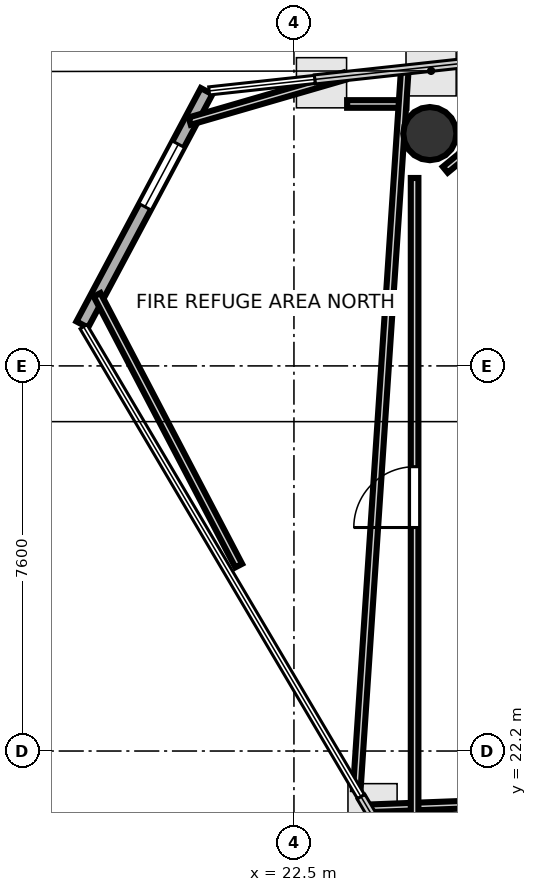
"""IFC4 building model, lengths in metres.
Left out: names, types, materials, properties, quantities, classifications, styles, units other than length and angle.
Written with IfcOpenShell. Run it as: python <this file> out.ifc"""

import sys

from ifc_helpers import new_model, si_unit, direction, frame, frame_2d, origin, origin_2d, place, context, subcontext, project, spatial, rectangle, hollow_circle, extrude, element, fill, save


model = new_model("IFC4")
c1 = context("Model", 3, precision=1e-05, world=origin(), true_north=direction((0.0, 1.0)))
c2 = subcontext(c1, "Body", "Model", "MODEL_VIEW")
j1 = project(units=[si_unit("LENGTHUNIT", "METRE"), si_unit("PLANEANGLEUNIT", "RADIAN")], contexts=[c1])
p1 = place(None, origin())
s1 = spatial("IfcSite", under=j1, at=p1, CompositionType="ELEMENT")
p2 = place(p1, origin())
s2 = spatial("IfcBuilding", under=s1, at=p2, CompositionType="ELEMENT")
p3 = place(p2, frame((0.0, 0.0, 276.0)))
s3 = spatial("IfcBuildingStorey", under=s2, at=p3, CompositionType="ELEMENT", Elevation=276.0)
p4 = place(p3, frame((25.182, 34.384, 0.0), z_axis=(0.0, 0.0, 1.0), x_axis=(1.0, 0.0, 0.0)))
e1 = element("IfcColumn", 1, at=p4, inside=s3, PredefinedType="COLUMN", context=c2, shape_type="SweptSolid", body=[
    extrude(hollow_circle(Radius=0.525, WallThickness=0.028, at=origin_2d()), origin(), (0.0, 0.0, 1.0), 4.6),
])
p5 = place(p3, frame((20.777, 35.221, 0.0), z_axis=(0.0, 0.0, 1.0), x_axis=(-0.470359968521, -0.882474645535, 0.0)))
e2 = element("IfcWall", 2, at=p5, inside=s3, PredefinedType="SOLIDWALL", context=c2, shape_type="SweptSolid", body=[
    extrude(rectangle(XDim=5.219, YDim=0.26, at=frame_2d((2.609, 0.0))), origin(), (0.0, 0.0, 1.0), 4.42),
])
p6 = place(p5, frame((1.186, 0.0, 1.0)))
e3 = element("IfcOpeningElement", 3, at=p6, cuts=e2, PredefinedType="OPENING", context=c2, shape_type="SweptSolid", body=[
    extrude(rectangle(XDim=1.4, YDim=1.5, at=frame_2d((0.7, 0.75))), frame((0.0, 0.14, 0.0), z_axis=(0.0, -1.0, 0.0), x_axis=(1.0, 0.0, 0.0)), (0.0, 0.0, 1.0), 0.28),
])
p7 = place(p3, frame((21.41, 25.859, 0.0), z_axis=(0.0, 0.0, 1.0), x_axis=(-0.463350319383, 0.886175197987, 0.0)))
e4 = element("IfcWall", 4, at=p7, inside=s3, PredefinedType="PARTITIONING", context=c2, shape_type="SweptSolid", body=[
    extrude(rectangle(XDim=6.031, YDim=0.15, at=frame_2d((3.015, 0.0))), origin(), (0.0, 0.0, 1.0), 2.94),
])
p8 = place(p3, frame((20.443, 34.631, 0.0), z_axis=(0.0, 0.0, 1.0), x_axis=(0.960305053104, 0.278951976124, 0.0)))
e5 = element("IfcWall", 5, at=p8, inside=s3, PredefinedType="PARTITIONING", context=c2, shape_type="SweptSolid", body=[
    extrude(rectangle(XDim=3.176, YDim=0.15, at=frame_2d((1.588, 0.0))), origin(), (0.0, 0.0, 1.0), 2.94),
])
p9 = place(p3, frame((23.549, 34.969, 0.0), z_axis=(0.0, 0.0, 1.0), x_axis=(1.0, 0.0, 0.0)))
e6 = element("IfcWall", 6, at=p9, inside=s3, PredefinedType="PARTITIONING", context=c2, shape_type="SweptSolid", body=[
    extrude(rectangle(XDim=1.171, YDim=0.15, at=frame_2d((0.585, 0.0))), origin(), (0.0, 0.0, 1.0), 2.94),
])
p10 = place(p3, frame((24.689, 35.667, 0.0), z_axis=(0.0, 0.0, 1.0), x_axis=(-0.066536056744, -0.997784021296, 0.0)))
e7 = element("IfcWall", 7, at=p10, inside=s3, PredefinedType="PARTITIONING", context=c2, shape_type="SweptSolid", body=[
    extrude(rectangle(XDim=14.259, YDim=0.15, at=frame_2d((7.129, 0.0))), origin(), (0.0, 0.0, 1.0), 2.94),
])
p11 = place(p3, frame((26.256, 21.156, 0.0), z_axis=(0.0, 0.0, 1.0), x_axis=(-0.999268778585, -0.038234907413, 0.0)))
e8 = element("IfcWall", 8, at=p11, inside=s3, PredefinedType="PARTITIONING", context=c2, shape_type="SweptSolid", body=[
    extrude(rectangle(XDim=2.318, YDim=0.15, at=frame_2d((1.159, 0.0))), origin(), (0.0, 0.0, 1.0), 2.94),
])
p12 = place(p3, frame((24.881, 19.488, 0.0), z_axis=(0.0, 0.0, 1.0), x_axis=(0.0, 1.0, 0.0)))
e9 = element("IfcWall", 9, at=p12, inside=s3, PredefinedType="PARTITIONING", context=c2, shape_type="SweptSolid", body=[
    extrude(rectangle(XDim=14.021, YDim=0.15, at=frame_2d((7.01, 0.0))), origin(), (0.0, 0.0, 1.0), 2.94),
])
p13 = place(p12, frame((7.123, 0.0, 0.0)))
e10 = element("IfcOpeningElement", 10, at=p13, cuts=e9, PredefinedType="OPENING", context=c2, shape_type="SweptSolid", body=[
    extrude(rectangle(XDim=1.2, YDim=2.15, at=frame_2d((0.6, 1.075))), frame((0.0, 0.085, 0.0), z_axis=(0.0, -1.0, 0.0), x_axis=(1.0, 0.0, 0.0)), (0.0, 0.0, 1.0), 0.17),
])
p14 = place(p3, frame((25.487, 33.672, 0.0), z_axis=(0.0, 0.0, 1.0), x_axis=(0.772874573992, 0.634558817507, 0.0)))
e11 = element("IfcWall", 11, at=p14, inside=s3, PredefinedType="PARTITIONING", context=c2, shape_type="SweptSolid", body=[
    extrude(rectangle(XDim=0.432, YDim=0.15, at=frame_2d((0.216, 0.0))), origin(), (0.0, 0.0, 1.0), 2.94),
])
p15 = place(p13, origin())
e12 = element("IfcDoor", 12, at=p15, inside=s3, OperationType="SINGLE_SWING_LEFT", PredefinedType="DOOR", context=c2, shape_type="SweptSolid", body=[
    extrude(rectangle(XDim=1.2, YDim=2.15, at=frame_2d((0.6, 1.075))), frame((0.0, 0.025, 0.0), z_axis=(0.0, -1.0, 0.0), x_axis=(1.0, 0.0, 0.0)), (0.0, 0.0, 1.0), 0.05),
])
fill(e10, e12)
p16 = place(p6, origin())
e13 = element("IfcWindow", 13, at=p16, inside=s3, PartitioningType="SINGLE_PANEL", PredefinedType="WINDOW", context=c2, shape_type="SweptSolid", body=[
    extrude(rectangle(XDim=1.4, YDim=1.5, at=frame_2d((0.7, 0.75))), frame((0.0, 0.03, 0.0), z_axis=(0.0, -1.0, 0.0), x_axis=(1.0, 0.0, 0.0)), (0.0, 0.0, 1.0), 0.06),
])
fill(e3, e13)
save(model, sys.argv[1])
